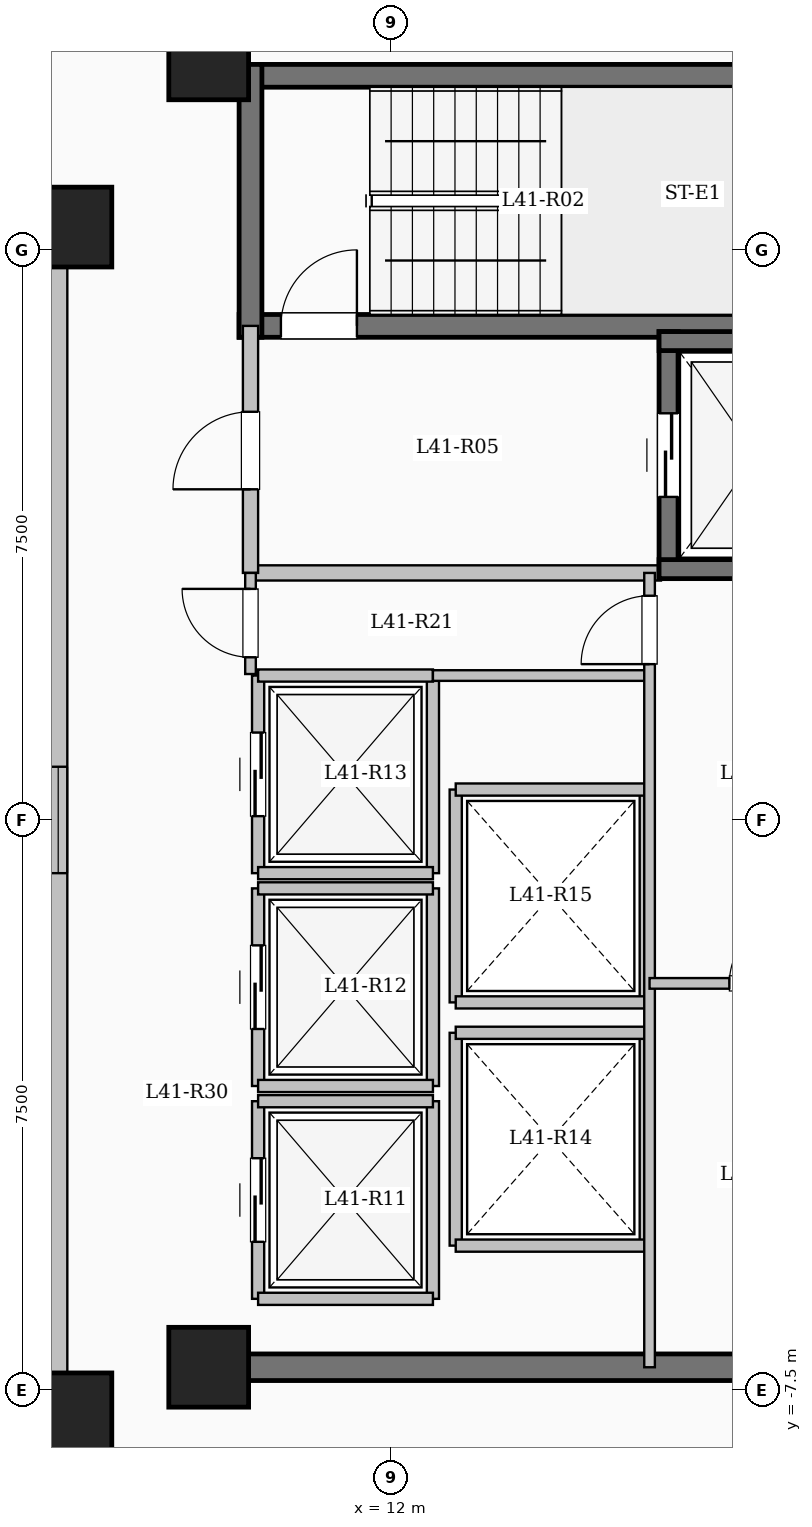
"""IFC4 building model, lengths in metres.
Left out: names, types, materials, properties, quantities, classifications, styles, units other than length and angle.
Written with IfcOpenShell. Run it as: python <this file> out.ifc"""

import sys

from ifc_helpers import new_model, si_unit, direction, frame, frame_2d, origin, origin_2d, place, context, subcontext, project, spatial, rectangle, extrude, element, fill, save


model = new_model("IFC4")
c1 = context("Model", 3, precision=1e-05, world=origin(), true_north=direction((0.0, 1.0)))
c2 = subcontext(c1, "Body", "Model", "MODEL_VIEW")
j1 = project(units=[si_unit("LENGTHUNIT", "METRE"), si_unit("PLANEANGLEUNIT", "RADIAN")], contexts=[c1])
p1 = place(None, origin())
s1 = spatial("IfcSite", under=j1, at=p1, CompositionType="ELEMENT")
p2 = place(p1, origin())
s2 = spatial("IfcBuilding", under=s1, at=p2, CompositionType="ELEMENT")
p3 = place(p2, frame((0.0, 0.0, 152.7)))
s3 = spatial("IfcBuildingStorey", under=s2, at=p3, CompositionType="ELEMENT", Elevation=152.7)
for number, where, z_axis, x_axis in (
    (1, (7.8, -7.8, 0.0), (0.0, 0.0, 1.0), (1.0, 0.0, 0.0)),
    (2, (7.8, 7.8, 0.0), (0.0, 0.0, 1.0), (1.0, 0.0, 0.0)),
    (3, (9.6, -7.2, 0.0), (0.0, 0.0, 1.0), (1.0, 0.0, 0.0)),
    (4, (9.6, 10.0, 0.0), (0.0, 0.0, 1.0), (1.0, 0.0, 0.0)),
):
    element("IfcColumn", number, at=place(p3, frame(where, z_axis=z_axis, x_axis=x_axis)), inside=s3, PredefinedType="COLUMN", context=c2, shape_type="SweptSolid", body=[
        extrude(rectangle(XDim=1.05, YDim=1.05, at=origin_2d()), origin(), (0.0, 0.0, 1.0), 3.35),
    ])
p4 = place(p3, frame((-7.62, -7.62, 0.0), z_axis=(0.0, 0.0, 1.0), x_axis=(1.0, 0.0, 0.0)))
e5 = element("IfcWall", 5, at=p4, inside=s3, PredefinedType="SOLIDWALL", context=c2, shape_type="SweptSolid", body=[
    extrude(rectangle(XDim=15.24, YDim=0.24, at=frame_2d((7.62, 0.0))), origin(), (0.0, 0.0, 1.0), 3.1),
])
p5 = place(p4, frame((6.92, 0.0, 0.95)))
e6 = element("IfcOpeningElement", 6, at=p5, cuts=e5, PredefinedType="OPENING", context=c2, shape_type="SweptSolid", body=[
    extrude(rectangle(XDim=1.4, YDim=1.5, at=frame_2d((0.7, 0.75))), frame((0.0, 0.13, 0.0), z_axis=(0.0, -1.0, 0.0), x_axis=(1.0, 0.0, 0.0)), (0.0, 0.0, 1.0), 0.26),
])
p6 = place(p3, frame((7.62, -7.62, 0.0), z_axis=(0.0, 0.0, 1.0), x_axis=(0.0, 1.0, 0.0)))
e7 = element("IfcWall", 7, at=p6, inside=s3, PredefinedType="SOLIDWALL", context=c2, shape_type="SweptSolid", body=[
    extrude(rectangle(XDim=15.24, YDim=0.24, at=frame_2d((7.62, 0.0))), origin(), (0.0, 0.0, 1.0), 3.1),
])
p7 = place(p6, frame((6.92, 0.0, 0.95)))
e8 = element("IfcOpeningElement", 8, at=p7, cuts=e7, PredefinedType="OPENING", context=c2, shape_type="SweptSolid", body=[
    extrude(rectangle(XDim=1.4, YDim=1.5, at=frame_2d((0.7, 0.75))), frame((0.0, 0.13, 0.0), z_axis=(0.0, -1.0, 0.0), x_axis=(1.0, 0.0, 0.0)), (0.0, 0.0, 1.0), 0.26),
])
p8 = place(p3, frame((7.62, 7.62, 0.0), z_axis=(0.0, 0.0, 1.0), x_axis=(-1.0, 0.0, 0.0)))
e9 = element("IfcWall", 9, at=p8, inside=s3, PredefinedType="SOLIDWALL", context=c2, shape_type="SweptSolid", body=[
    extrude(rectangle(XDim=15.24, YDim=0.24, at=frame_2d((7.62, 0.0))), origin(), (0.0, 0.0, 1.0), 3.1),
])
p9 = place(p8, frame((6.92, 0.0, 0.95)))
e10 = element("IfcOpeningElement", 10, at=p9, cuts=e9, PredefinedType="OPENING", context=c2, shape_type="SweptSolid", body=[
    extrude(rectangle(XDim=1.4, YDim=1.5, at=frame_2d((0.7, 0.75))), frame((0.0, 0.13, 0.0), z_axis=(0.0, -1.0, 0.0), x_axis=(1.0, 0.0, 0.0)), (0.0, 0.0, 1.0), 0.26),
])
p10 = place(p3, frame((10.0, 9.79, 0.0), z_axis=(0.0, 0.0, 1.0), x_axis=(1.0, 0.0, 0.0)))
e11 = element("IfcWall", 11, at=p10, inside=s3, PredefinedType="SHEAR", context=c2, shape_type="SweptSolid", body=[
    extrude(rectangle(XDim=8.0, YDim=0.3, at=frame_2d((4.0, 0.0))), origin(), (0.0, 0.0, 1.0), 3.35),
])
p11 = place(p3, frame((10.0, 6.5, 0.0), z_axis=(0.0, 0.0, 1.0), x_axis=(1.0, 0.0, 0.0)))
e12 = element("IfcWall", 12, at=p11, inside=s3, PredefinedType="SHEAR", context=c2, shape_type="SweptSolid", body=[
    extrude(rectangle(XDim=8.0, YDim=0.3, at=frame_2d((4.0, 0.0))), origin(), (0.0, 0.0, 1.0), 3.35),
])
p12 = place(p11, frame((0.55, 0.0, 0.0)))
e13 = element("IfcOpeningElement", 13, at=p12, cuts=e12, PredefinedType="OPENING", context=c2, shape_type="SweptSolid", body=[
    extrude(rectangle(XDim=1.0, YDim=2.15, at=frame_2d((0.5, 1.075))), frame((0.0, 0.16, 0.0), z_axis=(0.0, -1.0, 0.0), x_axis=(1.0, 0.0, 0.0)), (0.0, 0.0, 1.0), 0.32),
])
p13 = place(p3, frame((10.15, 6.35, 0.0), z_axis=(0.0, 0.0, 1.0), x_axis=(0.0, 1.0, 0.0)))
e14 = element("IfcWall", 14, at=p13, inside=s3, PredefinedType="SHEAR", context=c2, shape_type="SweptSolid", body=[
    extrude(rectangle(XDim=3.59, YDim=0.3, at=frame_2d((1.795, 0.0))), origin(), (0.0, 0.0, 1.0), 3.35),
])
p14 = place(p3, frame((10.15, 3.25, 0.0), z_axis=(0.0, 0.0, 1.0), x_axis=(1.0, 0.0, 0.0)))
e15 = element("IfcWall", 15, at=p14, inside=s3, PredefinedType="SOLIDWALL", context=c2, shape_type="SweptSolid", body=[
    extrude(rectangle(XDim=5.4, YDim=0.2, at=frame_2d((2.7, 0.0))), origin(), (0.0, 0.0, 1.0), 3.1),
])
p15 = place(p3, frame((10.15, 3.25, 0.0), z_axis=(0.0, 0.0, 1.0), x_axis=(0.0, 1.0, 0.0)))
e16 = element("IfcWall", 16, at=p15, inside=s3, PredefinedType="SOLIDWALL", context=c2, shape_type="SweptSolid", body=[
    extrude(rectangle(XDim=3.25, YDim=0.2, at=frame_2d((1.625, 0.0))), origin(), (0.0, 0.0, 1.0), 3.1),
])
p16 = place(p15, frame((1.1, 0.0, 0.0)))
e17 = element("IfcOpeningElement", 17, at=p16, cuts=e16, PredefinedType="OPENING", context=c2, shape_type="SweptSolid", body=[
    extrude(rectangle(XDim=1.02, YDim=2.15, at=frame_2d((0.51, 1.075))), frame((0.0, 0.11, 0.0), z_axis=(0.0, -1.0, 0.0), x_axis=(1.0, 0.0, 0.0)), (0.0, 0.0, 1.0), 0.22),
])
p17 = place(p3, frame((15.65, 3.175, 0.0), z_axis=(0.0, 0.0, 1.0), x_axis=(0.0, 1.0, 0.0)))
e18 = element("IfcWall", 18, at=p17, inside=s3, PredefinedType="SHEAR", context=c2, shape_type="SweptSolid", body=[
    extrude(rectangle(XDim=3.25, YDim=0.25, at=frame_2d((1.625, 0.0))), origin(), (0.0, 0.0, 1.0), 3.35),
])
p18 = place(p17, frame((1.075, 0.0, 0.0)))
e19 = element("IfcOpeningElement", 19, at=p18, cuts=e18, PredefinedType="OPENING", context=c2, shape_type="SweptSolid", body=[
    extrude(rectangle(XDim=1.1, YDim=2.15, at=frame_2d((0.55, 1.075))), frame((0.0, 0.135, 0.0), z_axis=(0.0, -1.0, 0.0), x_axis=(1.0, 0.0, 0.0)), (0.0, 0.0, 1.0), 0.27),
])
for number, where, z_axis, x_axis in (
    (20, (15.525, 3.3, 0.0), (0.0, 0.0, 1.0), (1.0, 0.0, 0.0)),
    (21, (15.525, 6.3, 0.0), (0.0, 0.0, 1.0), (1.0, 0.0, 0.0)),
):
    element("IfcWall", number, at=place(p3, frame(where, z_axis=z_axis, x_axis=x_axis)), inside=s3, PredefinedType="SHEAR", context=c2, shape_type="SweptSolid", body=[
        extrude(rectangle(XDim=2.55, YDim=0.25, at=frame_2d((1.275, 0.0))), origin(), (0.0, 0.0, 1.0), 3.35),
    ])
p19 = place(p3, frame((10.25, -6.3, 0.0), z_axis=(0.0, 0.0, 1.0), x_axis=(0.0, 1.0, 0.0)))
e22 = element("IfcWall", 22, at=p19, inside=s3, PredefinedType="SOLIDWALL", context=c2, shape_type="SweptSolid", body=[
    extrude(rectangle(XDim=2.6, YDim=0.16, at=frame_2d((1.3, 0.0))), origin(), (0.0, 0.0, 1.0), 3.1),
])
p20 = place(p19, frame((0.75, 0.0, 0.0)))
e23 = element("IfcOpeningElement", 23, at=p20, cuts=e22, PredefinedType="OPENING", context=c2, shape_type="SweptSolid", body=[
    extrude(rectangle(XDim=1.1, YDim=2.15, at=frame_2d((0.55, 1.075))), frame((0.0, 0.09, 0.0), z_axis=(0.0, -1.0, 0.0), x_axis=(1.0, 0.0, 0.0)), (0.0, 0.0, 1.0), 0.18),
])
p21 = place(p3, frame((12.55, -6.3, 0.0), z_axis=(0.0, 0.0, 1.0), x_axis=(0.0, 1.0, 0.0)))
e24 = element("IfcWall", 24, at=p21, inside=s3, PredefinedType="SOLIDWALL", context=c2, shape_type="SweptSolid", body=[
    extrude(rectangle(XDim=2.6, YDim=0.16, at=frame_2d((1.3, 0.0))), origin(), (0.0, 0.0, 1.0), 3.1),
])
for number, where, z_axis, x_axis in (
    (25, (10.25, -6.3, 0.0), (0.0, 0.0, 1.0), (1.0, 0.0, 0.0)),
    (26, (10.25, -3.7, 0.0), (0.0, 0.0, 1.0), (1.0, 0.0, 0.0)),
):
    element("IfcWall", number, at=place(p3, frame(where, z_axis=z_axis, x_axis=x_axis)), inside=s3, PredefinedType="SOLIDWALL", context=c2, shape_type="SweptSolid", body=[
        extrude(rectangle(XDim=2.3, YDim=0.16, at=frame_2d((1.15, 0.0))), origin(), (0.0, 0.0, 1.0), 3.1),
    ])
p22 = place(p3, frame((10.25, -3.5, 0.0), z_axis=(0.0, 0.0, 1.0), x_axis=(0.0, 1.0, 0.0)))
e27 = element("IfcWall", 27, at=p22, inside=s3, PredefinedType="SOLIDWALL", context=c2, shape_type="SweptSolid", body=[
    extrude(rectangle(XDim=2.6, YDim=0.16, at=frame_2d((1.3, 0.0))), origin(), (0.0, 0.0, 1.0), 3.1),
])
p23 = place(p22, frame((0.75, 0.0, 0.0)))
e28 = element("IfcOpeningElement", 28, at=p23, cuts=e27, PredefinedType="OPENING", context=c2, shape_type="SweptSolid", body=[
    extrude(rectangle(XDim=1.1, YDim=2.15, at=frame_2d((0.55, 1.075))), frame((0.0, 0.09, 0.0), z_axis=(0.0, -1.0, 0.0), x_axis=(1.0, 0.0, 0.0)), (0.0, 0.0, 1.0), 0.18),
])
p24 = place(p3, frame((12.55, -3.5, 0.0), z_axis=(0.0, 0.0, 1.0), x_axis=(0.0, 1.0, 0.0)))
e29 = element("IfcWall", 29, at=p24, inside=s3, PredefinedType="SOLIDWALL", context=c2, shape_type="SweptSolid", body=[
    extrude(rectangle(XDim=2.6, YDim=0.16, at=frame_2d((1.3, 0.0))), origin(), (0.0, 0.0, 1.0), 3.1),
])
for number, where, z_axis, x_axis in (
    (30, (10.25, -3.5, 0.0), (0.0, 0.0, 1.0), (1.0, 0.0, 0.0)),
    (31, (10.25, -0.9, 0.0), (0.0, 0.0, 1.0), (1.0, 0.0, 0.0)),
):
    element("IfcWall", number, at=place(p3, frame(where, z_axis=z_axis, x_axis=x_axis)), inside=s3, PredefinedType="SOLIDWALL", context=c2, shape_type="SweptSolid", body=[
        extrude(rectangle(XDim=2.3, YDim=0.16, at=frame_2d((1.15, 0.0))), origin(), (0.0, 0.0, 1.0), 3.1),
    ])
p25 = place(p3, frame((10.25, -0.7, 0.0), z_axis=(0.0, 0.0, 1.0), x_axis=(0.0, 1.0, 0.0)))
e32 = element("IfcWall", 32, at=p25, inside=s3, PredefinedType="SOLIDWALL", context=c2, shape_type="SweptSolid", body=[
    extrude(rectangle(XDim=2.6, YDim=0.16, at=frame_2d((1.3, 0.0))), origin(), (0.0, 0.0, 1.0), 3.1),
])
p26 = place(p25, frame((0.75, 0.0, 0.0)))
e33 = element("IfcOpeningElement", 33, at=p26, cuts=e32, PredefinedType="OPENING", context=c2, shape_type="SweptSolid", body=[
    extrude(rectangle(XDim=1.1, YDim=2.15, at=frame_2d((0.55, 1.075))), frame((0.0, 0.09, 0.0), z_axis=(0.0, -1.0, 0.0), x_axis=(1.0, 0.0, 0.0)), (0.0, 0.0, 1.0), 0.18),
])
p27 = place(p3, frame((12.55, -0.7, 0.0), z_axis=(0.0, 0.0, 1.0), x_axis=(0.0, 1.0, 0.0)))
e34 = element("IfcWall", 34, at=p27, inside=s3, PredefinedType="SOLIDWALL", context=c2, shape_type="SweptSolid", body=[
    extrude(rectangle(XDim=2.6, YDim=0.16, at=frame_2d((1.3, 0.0))), origin(), (0.0, 0.0, 1.0), 3.1),
])
for number, where, z_axis, x_axis in (
    (35, (10.25, -0.7, 0.0), (0.0, 0.0, 1.0), (1.0, 0.0, 0.0)),
    (36, (10.25, 1.9, 0.0), (0.0, 0.0, 1.0), (1.0, 0.0, 0.0)),
):
    element("IfcWall", number, at=place(p3, frame(where, z_axis=z_axis, x_axis=x_axis)), inside=s3, PredefinedType="SOLIDWALL", context=c2, shape_type="SweptSolid", body=[
        extrude(rectangle(XDim=2.3, YDim=0.16, at=frame_2d((1.15, 0.0))), origin(), (0.0, 0.0, 1.0), 3.1),
    ])
for number, where, z_axis, x_axis in (
    (37, (12.85, -5.6, 0.0), (0.0, 0.0, 1.0), (0.0, 1.0, 0.0)),
    (38, (15.35, -5.6, 0.0), (0.0, 0.0, 1.0), (0.0, 1.0, 0.0)),
):
    element("IfcWall", number, at=place(p3, frame(where, z_axis=z_axis, x_axis=x_axis)), inside=s3, PredefinedType="SOLIDWALL", context=c2, shape_type="SweptSolid", body=[
        extrude(rectangle(XDim=2.8, YDim=0.16, at=frame_2d((1.4, 0.0))), origin(), (0.0, 0.0, 1.0), 3.1),
    ])
for number, where, z_axis, x_axis in (
    (39, (12.85, -5.6, 0.0), (0.0, 0.0, 1.0), (1.0, 0.0, 0.0)),
    (40, (12.85, -2.8, 0.0), (0.0, 0.0, 1.0), (1.0, 0.0, 0.0)),
):
    element("IfcWall", number, at=place(p3, frame(where, z_axis=z_axis, x_axis=x_axis)), inside=s3, PredefinedType="SOLIDWALL", context=c2, shape_type="SweptSolid", body=[
        extrude(rectangle(XDim=2.5, YDim=0.16, at=frame_2d((1.25, 0.0))), origin(), (0.0, 0.0, 1.0), 3.1),
    ])
for number, where, z_axis, x_axis in (
    (41, (12.85, -2.4, 0.0), (0.0, 0.0, 1.0), (0.0, 1.0, 0.0)),
    (42, (15.35, -2.4, 0.0), (0.0, 0.0, 1.0), (0.0, 1.0, 0.0)),
):
    element("IfcWall", number, at=place(p3, frame(where, z_axis=z_axis, x_axis=x_axis)), inside=s3, PredefinedType="SOLIDWALL", context=c2, shape_type="SweptSolid", body=[
        extrude(rectangle(XDim=2.8, YDim=0.16, at=frame_2d((1.4, 0.0))), origin(), (0.0, 0.0, 1.0), 3.1),
    ])
for number, where, z_axis, x_axis in (
    (43, (12.85, -2.4, 0.0), (0.0, 0.0, 1.0), (1.0, 0.0, 0.0)),
    (44, (12.85, 0.4, 0.0), (0.0, 0.0, 1.0), (1.0, 0.0, 0.0)),
):
    element("IfcWall", number, at=place(p3, frame(where, z_axis=z_axis, x_axis=x_axis)), inside=s3, PredefinedType="SOLIDWALL", context=c2, shape_type="SweptSolid", body=[
        extrude(rectangle(XDim=2.5, YDim=0.16, at=frame_2d((1.25, 0.0))), origin(), (0.0, 0.0, 1.0), 3.1),
    ])
p28 = place(p3, frame((10.075, -7.2, 0.0), z_axis=(0.0, 0.0, 1.0), x_axis=(1.0, 0.0, 0.0)))
e45 = element("IfcWall", 45, at=p28, inside=s3, PredefinedType="SHEAR", context=c2, shape_type="SweptSolid", body=[
    extrude(rectangle(XDim=8.55, YDim=0.35, at=frame_2d((4.275, 0.0))), origin(), (0.0, 0.0, 1.0), 3.35),
])
p29 = place(p3, frame((12.55, 1.9, 0.0), z_axis=(0.0, 0.0, 1.0), x_axis=(1.0, 0.0, 0.0)))
e46 = element("IfcWall", 46, at=p29, inside=s3, PredefinedType="PARTITIONING", context=c2, shape_type="SweptSolid", body=[
    extrude(rectangle(XDim=2.85, YDim=0.14, at=frame_2d((1.425, 0.0))), origin(), (0.0, 0.0, 1.0), 3.1),
])
p30 = place(p3, frame((10.15, 1.92, 0.0), z_axis=(0.0, 0.0, 1.0), x_axis=(0.0, 1.0, 0.0)))
e47 = element("IfcWall", 47, at=p30, inside=s3, PredefinedType="PARTITIONING", context=c2, shape_type="SweptSolid", body=[
    extrude(rectangle(XDim=1.33, YDim=0.14, at=frame_2d((0.665, 0.0))), origin(), (0.0, 0.0, 1.0), 3.1),
])
p31 = place(p30, frame((0.22, 0.0, 0.0)))
e48 = element("IfcOpeningElement", 48, at=p31, cuts=e47, PredefinedType="OPENING", context=c2, shape_type="SweptSolid", body=[
    extrude(rectangle(XDim=0.9, YDim=2.08, at=frame_2d((0.45, 1.04))), frame((0.0, 0.08, 0.0), z_axis=(0.0, -1.0, 0.0), x_axis=(1.0, 0.0, 0.0)), (0.0, 0.0, 1.0), 0.16),
])
p32 = place(p3, frame((15.4, -7.2, 0.0), z_axis=(0.0, 0.0, 1.0), x_axis=(0.0, 1.0, 0.0)))
e49 = element("IfcWall", 49, at=p32, inside=s3, PredefinedType="PARTITIONING", context=c2, shape_type="SweptSolid", body=[
    extrude(rectangle(XDim=10.45, YDim=0.14, at=frame_2d((5.225, 0.0))), origin(), (0.0, 0.0, 1.0), 3.1),
])
p33 = place(p32, frame((9.25, 0.0, 0.0)))
e50 = element("IfcOpeningElement", 50, at=p33, cuts=e49, PredefinedType="OPENING", context=c2, shape_type="SweptSolid", body=[
    extrude(rectangle(XDim=0.9, YDim=2.08, at=frame_2d((0.45, 1.04))), frame((0.0, 0.08, 0.0), z_axis=(0.0, -1.0, 0.0), x_axis=(1.0, 0.0, 0.0)), (0.0, 0.0, 1.0), 0.16),
])
p34 = place(p3, frame((15.4, -2.15, 0.0), z_axis=(0.0, 0.0, 1.0), x_axis=(1.0, 0.0, 0.0)))
e51 = element("IfcWall", 51, at=p34, inside=s3, PredefinedType="PARTITIONING", context=c2, shape_type="SweptSolid", body=[
    extrude(rectangle(XDim=3.05, YDim=0.14, at=frame_2d((1.525, 0.0))), origin(), (0.0, 0.0, 1.0), 3.1),
])
p35 = place(p34, frame((1.05, 0.0, 0.0)))
e52 = element("IfcOpeningElement", 52, at=p35, cuts=e51, PredefinedType="OPENING", context=c2, shape_type="SweptSolid", body=[
    extrude(rectangle(XDim=0.9, YDim=2.08, at=frame_2d((0.45, 1.04))), frame((0.0, 0.08, 0.0), z_axis=(0.0, -1.0, 0.0), x_axis=(1.0, 0.0, 0.0)), (0.0, 0.0, 1.0), 0.16),
])
p36 = place(p7, origin())
e53 = element("IfcWindow", 53, at=p36, inside=s3, PartitioningType="SINGLE_PANEL", PredefinedType="WINDOW", context=c2, shape_type="SweptSolid", body=[
    extrude(rectangle(XDim=1.4, YDim=1.5, at=frame_2d((0.7, 0.75))), frame((0.0, 0.03, 0.0), z_axis=(0.0, -1.0, 0.0), x_axis=(1.0, 0.0, 0.0)), (0.0, 0.0, 1.0), 0.06),
])
fill(e8, e53)
p37 = place(p12, origin())
e54 = element("IfcDoor", 54, at=p37, inside=s3, OperationType="SINGLE_SWING_RIGHT", PredefinedType="DOOR", context=c2, shape_type="SweptSolid", body=[
    extrude(rectangle(XDim=1.0, YDim=2.15, at=frame_2d((0.5, 1.075))), frame((0.0, 0.025, 0.0), z_axis=(0.0, -1.0, 0.0), x_axis=(1.0, 0.0, 0.0)), (0.0, 0.0, 1.0), 0.05),
])
fill(e13, e54)
p38 = place(p16, origin())
e55 = element("IfcDoor", 55, at=p38, inside=s3, OperationType="SINGLE_SWING_LEFT", PredefinedType="DOOR", context=c2, shape_type="SweptSolid", body=[
    extrude(rectangle(XDim=1.02, YDim=2.15, at=frame_2d((0.51, 1.075))), frame((0.0, 0.025, 0.0), z_axis=(0.0, -1.0, 0.0), x_axis=(1.0, 0.0, 0.0)), (0.0, 0.0, 1.0), 0.05),
])
fill(e17, e55)
p39 = place(p18, origin())
e56 = element("IfcDoor", 56, at=p39, inside=s3, OperationType="SLIDING_TO_LEFT", PredefinedType="DOOR", context=c2, shape_type="SweptSolid", body=[
    extrude(rectangle(XDim=1.1, YDim=2.15, at=frame_2d((0.55, 1.075))), frame((0.0, 0.025, 0.0), z_axis=(0.0, -1.0, 0.0), x_axis=(1.0, 0.0, 0.0)), (0.0, 0.0, 1.0), 0.05),
])
fill(e19, e56)
p40 = place(p20, origin())
e57 = element("IfcDoor", 57, at=p40, inside=s3, OperationType="SLIDING_TO_LEFT", PredefinedType="DOOR", context=c2, shape_type="SweptSolid", body=[
    extrude(rectangle(XDim=1.1, YDim=2.15, at=frame_2d((0.55, 1.075))), frame((0.0, 0.025, 0.0), z_axis=(0.0, -1.0, 0.0), x_axis=(1.0, 0.0, 0.0)), (0.0, 0.0, 1.0), 0.05),
])
fill(e23, e57)
p41 = place(p23, origin())
e58 = element("IfcDoor", 58, at=p41, inside=s3, OperationType="SLIDING_TO_LEFT", PredefinedType="DOOR", context=c2, shape_type="SweptSolid", body=[
    extrude(rectangle(XDim=1.1, YDim=2.15, at=frame_2d((0.55, 1.075))), frame((0.0, 0.025, 0.0), z_axis=(0.0, -1.0, 0.0), x_axis=(1.0, 0.0, 0.0)), (0.0, 0.0, 1.0), 0.05),
])
fill(e28, e58)
p42 = place(p26, origin())
e59 = element("IfcDoor", 59, at=p42, inside=s3, OperationType="SLIDING_TO_LEFT", PredefinedType="DOOR", context=c2, shape_type="SweptSolid", body=[
    extrude(rectangle(XDim=1.1, YDim=2.15, at=frame_2d((0.55, 1.075))), frame((0.0, 0.025, 0.0), z_axis=(0.0, -1.0, 0.0), x_axis=(1.0, 0.0, 0.0)), (0.0, 0.0, 1.0), 0.05),
])
fill(e33, e59)
p43 = place(p31, origin())
e60 = element("IfcDoor", 60, at=p43, inside=s3, OperationType="SINGLE_SWING_RIGHT", PredefinedType="DOOR", context=c2, shape_type="SweptSolid", body=[
    extrude(rectangle(XDim=0.9, YDim=2.08, at=frame_2d((0.45, 1.04))), frame((0.0, 0.025, 0.0), z_axis=(0.0, -1.0, 0.0), x_axis=(1.0, 0.0, 0.0)), (0.0, 0.0, 1.0), 0.05),
])
fill(e48, e60)
p44 = place(p33, origin())
e61 = element("IfcDoor", 61, at=p44, inside=s3, OperationType="SINGLE_SWING_LEFT", PredefinedType="DOOR", context=c2, shape_type="SweptSolid", body=[
    extrude(rectangle(XDim=0.9, YDim=2.08, at=frame_2d((0.45, 1.04))), frame((0.0, 0.025, 0.0), z_axis=(0.0, -1.0, 0.0), x_axis=(1.0, 0.0, 0.0)), (0.0, 0.0, 1.0), 0.05),
])
fill(e50, e61)
p45 = place(p35, origin())
e62 = element("IfcDoor", 62, at=p45, inside=s3, OperationType="SINGLE_SWING_RIGHT", PredefinedType="DOOR", context=c2, shape_type="SweptSolid", body=[
    extrude(rectangle(XDim=0.9, YDim=2.08, at=frame_2d((0.45, 1.04))), frame((0.0, 0.025, 0.0), z_axis=(0.0, -1.0, 0.0), x_axis=(1.0, 0.0, 0.0)), (0.0, 0.0, 1.0), 0.05),
])
fill(e52, e62)
save(model, sys.argv[1])
